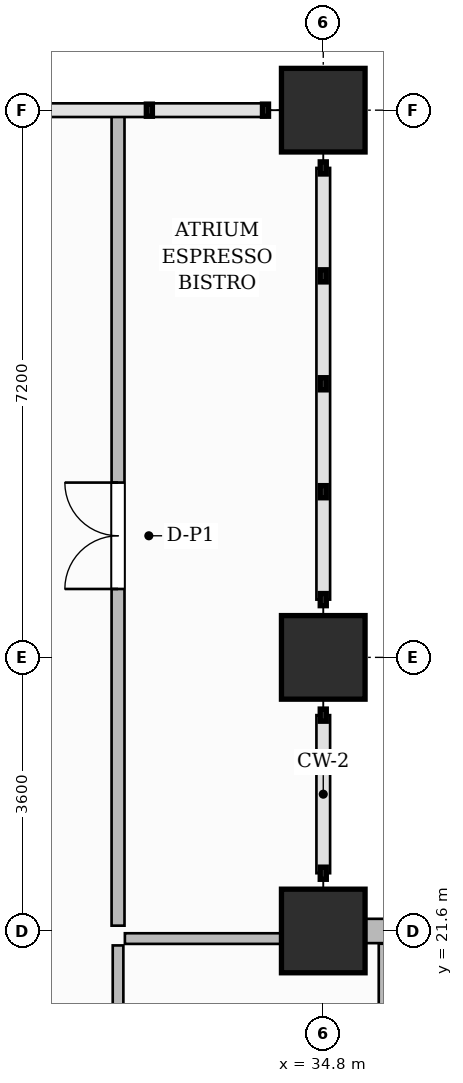
"""IFC4 building model, lengths in metres.
Left out: names, types, materials, properties, quantities, classifications, styles, units other than length and angle.
Written with IfcOpenShell. Run it as: python <this file> out.ifc"""

import sys

from ifc_helpers import new_model, si_unit, direction, frame, frame_2d, origin, origin_2d, place, context, subcontext, project, spatial, rectangle, extrude, source, transform, mapped, element, fill, save


model = new_model("IFC4")
c1 = context("Model", 3, precision=1e-05, world=origin(), true_north=direction((0.0, 1.0)))
c2 = subcontext(c1, "Body", "Model", "MODEL_VIEW")
j1 = project(units=[si_unit("LENGTHUNIT", "METRE"), si_unit("PLANEANGLEUNIT", "RADIAN")], contexts=[c1])
p1 = place(None, origin())
s1 = spatial("IfcSite", under=j1, at=p1, CompositionType="ELEMENT")
p2 = place(p1, origin())
s2 = spatial("IfcBuilding", under=s1, at=p2, CompositionType="ELEMENT")
p3 = place(p2, frame((0.0, 0.0, 91.6)))
s3 = spatial("IfcBuildingStorey", under=s2, at=p3, CompositionType="ELEMENT", Elevation=91.6)
m1 = source(origin(), c2, "Body", "SweptSolid", [
    extrude(rectangle(XDim=1.1, YDim=1.1, at=origin_2d()), origin(), (0.0, 0.0, 1.0), 3.7),
])
for number, where, z_axis, x_axis in (
    (1, (34.8, 21.6, 0.0), (0.0, 0.0, 1.0), (1.0, 0.0, 0.0)),
    (2, (34.8, 25.2, 0.0), (0.0, 0.0, 1.0), (1.0, 0.0, 0.0)),
    (3, (34.8, 32.4, 0.0), (0.0, 0.0, 1.0), (1.0, 0.0, 0.0)),
):
    element("IfcColumn", number, at=place(p3, frame(where, z_axis=z_axis, x_axis=x_axis)), inside=s3, PredefinedType="COLUMN", context=c2, shape_type="MappedRepresentation", body=[
        mapped(m1, transform((0.0, 0.0, 0.0), scale=1.0)),
    ])
p4 = place(p3, frame((32.1, 16.54, 0.0), z_axis=(0.0, 0.0, 1.0), x_axis=(0.0, 1.0, 0.0)))
e4 = element("IfcWall", 4, at=p4, inside=s3, PredefinedType="PARTITIONING", context=c2, shape_type="SweptSolid", body=[
    extrude(rectangle(XDim=4.87, YDim=0.14, at=frame_2d((2.435, 0.0))), origin(), (0.0, 0.0, 1.0), 3.45),
])
p5 = place(p3, frame((35.6, 16.54, 0.0), z_axis=(0.0, 0.0, 1.0), x_axis=(0.0, 1.0, 0.0)))
e5 = element("IfcWall", 5, at=p5, inside=s3, PredefinedType="PARTITIONING", context=c2, shape_type="SweptSolid", body=[
    extrude(rectangle(XDim=4.892, YDim=0.14, at=frame_2d((2.446, 0.0))), origin(), (0.0, 0.0, 1.0), 3.45),
])
p6 = place(p3, frame((32.19, 21.5, 0.0), z_axis=(0.0, 0.0, 1.0), x_axis=(1.0, 0.0, 0.0)))
e6 = element("IfcWall", 6, at=p6, inside=s3, PredefinedType="PARTITIONING", context=c2, shape_type="SweptSolid", body=[
    extrude(rectangle(XDim=2.42, YDim=0.14, at=frame_2d((1.21, 0.0))), origin(), (0.0, 0.0, 1.0), 2.885),
])
p7 = place(p3, frame((32.1, 21.67, 0.0), z_axis=(0.0, 0.0, 1.0), x_axis=(0.0, 1.0, 0.0)))
e7 = element("IfcWall", 7, at=p7, inside=s3, PredefinedType="PARTITIONING", context=c2, shape_type="SweptSolid", body=[
    extrude(rectangle(XDim=10.702, YDim=0.17, at=frame_2d((5.351, 0.0))), origin(), (0.0, 0.0, 1.0), 3.45),
])
p8 = place(p7, frame((4.43, 0.0, 0.0)))
e8 = element("IfcOpeningElement", 8, at=p8, cuts=e7, PredefinedType="OPENING", context=c2, shape_type="SweptSolid", body=[
    extrude(rectangle(XDim=1.4, YDim=2.35, at=frame_2d((0.7, 1.175))), frame((0.0, 0.095, 0.0), z_axis=(0.0, -1.0, 0.0), x_axis=(1.0, 0.0, 0.0)), (0.0, 0.0, 1.0), 0.19),
])
p9 = place(p3, frame((34.8, 21.6, 0.0), z_axis=(0.0, 0.0, 1.0), x_axis=(1.0, 0.0, 0.0)))
e9 = element("IfcWall", 9, at=p9, inside=s3, PredefinedType="SOLIDWALL", context=c2, shape_type="SweptSolid", body=[
    extrude(rectangle(XDim=22.8, YDim=0.32, at=frame_2d((11.4, 0.0))), origin(), (0.0, 0.0, 1.0), 2.885),
])
p10 = place(p9, frame((1.331, 0.0, 0.8)))
e10 = element("IfcOpeningElement", 10, at=p10, cuts=e9, PredefinedType="OPENING", context=c2, shape_type="SweptSolid", body=[
    extrude(rectangle(XDim=1.8, YDim=1.85, at=frame_2d((0.9, 0.925))), frame((0.0, 0.17, 0.0), z_axis=(0.0, -1.0, 0.0), x_axis=(1.0, 0.0, 0.0)), (0.0, 0.0, 1.0), 0.34),
])
p11 = place(p9, frame((4.077, 0.0, 0.8)))
e11 = element("IfcOpeningElement", 11, at=p11, cuts=e9, PredefinedType="OPENING", context=c2, shape_type="SweptSolid", body=[
    extrude(rectangle(XDim=1.8, YDim=1.85, at=frame_2d((0.9, 0.925))), frame((0.0, 0.17, 0.0), z_axis=(0.0, -1.0, 0.0), x_axis=(1.0, 0.0, 0.0)), (0.0, 0.0, 1.0), 0.34),
])
p12 = place(p9, frame((9.131, 0.0, 0.8)))
e12 = element("IfcOpeningElement", 12, at=p12, cuts=e9, PredefinedType="OPENING", context=c2, shape_type="SweptSolid", body=[
    extrude(rectangle(XDim=1.8, YDim=1.85, at=frame_2d((0.9, 0.925))), frame((0.0, 0.17, 0.0), z_axis=(0.0, -1.0, 0.0), x_axis=(1.0, 0.0, 0.0)), (0.0, 0.0, 1.0), 0.34),
])
p13 = place(p9, frame((11.877, 0.0, 0.8)))
e13 = element("IfcOpeningElement", 13, at=p13, cuts=e9, PredefinedType="OPENING", context=c2, shape_type="SweptSolid", body=[
    extrude(rectangle(XDim=1.8, YDim=1.85, at=frame_2d((0.9, 0.925))), frame((0.0, 0.17, 0.0), z_axis=(0.0, -1.0, 0.0), x_axis=(1.0, 0.0, 0.0)), (0.0, 0.0, 1.0), 0.34),
])
p14 = place(p9, frame((16.475, 0.0, 0.8)))
e14 = element("IfcOpeningElement", 14, at=p14, cuts=e9, PredefinedType="OPENING", context=c2, shape_type="SweptSolid", body=[
    extrude(rectangle(XDim=1.8, YDim=1.85, at=frame_2d((0.9, 0.925))), frame((0.0, 0.17, 0.0), z_axis=(0.0, -1.0, 0.0), x_axis=(1.0, 0.0, 0.0)), (0.0, 0.0, 1.0), 0.34),
])
p15 = place(p9, frame((19.525, 0.0, 0.8)))
e15 = element("IfcOpeningElement", 15, at=p15, cuts=e9, PredefinedType="OPENING", context=c2, shape_type="SweptSolid", body=[
    extrude(rectangle(XDim=1.8, YDim=1.85, at=frame_2d((0.9, 0.925))), frame((0.0, 0.17, 0.0), z_axis=(0.0, -1.0, 0.0), x_axis=(1.0, 0.0, 0.0)), (0.0, 0.0, 1.0), 0.34),
])
m2 = source(origin(), c2, "Body", "SweptSolid", [
    extrude(rectangle(XDim=1.4, YDim=2.35, at=frame_2d((0.7, 1.175))), frame((0.0, 0.025, 0.0), z_axis=(0.0, -1.0, 0.0), x_axis=(1.0, 0.0, 0.0)), (0.0, 0.0, 1.0), 0.05),
])
p16 = place(p8, origin())
e16 = element("IfcDoor", 16, at=p16, inside=s3, OperationType="DOUBLE_DOOR_SINGLE_SWING", PredefinedType="DOOR", context=c2, shape_type="MappedRepresentation", body=[
    mapped(m2, transform((0.0, 0.0, 0.0), scale=1.0)),
])
fill(e8, e16)
save(model, sys.argv[1])
